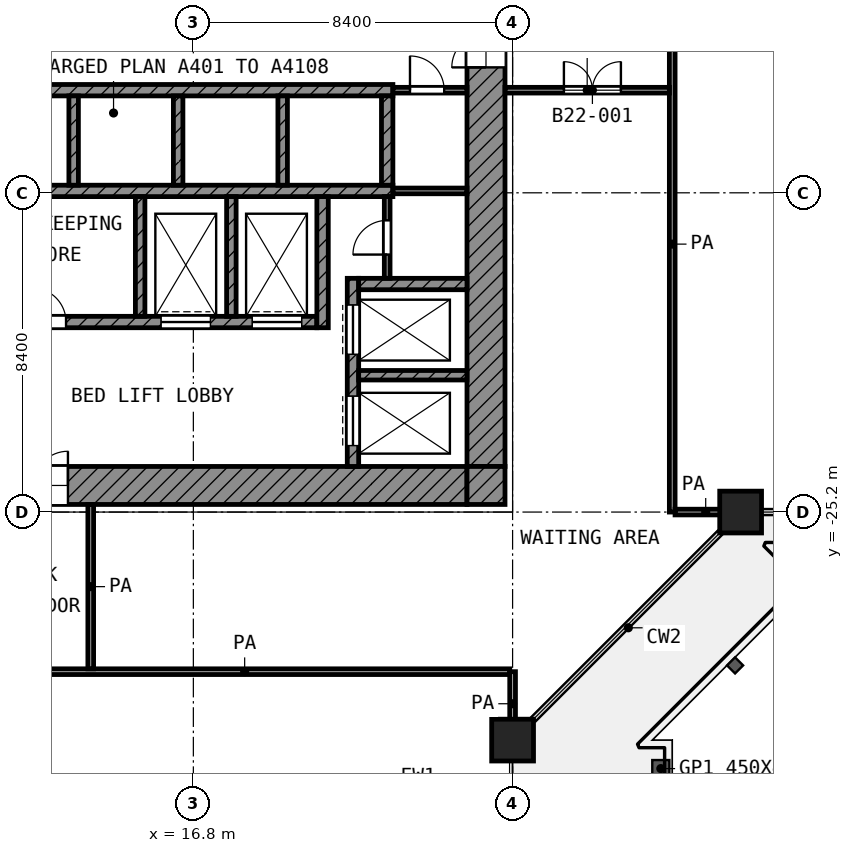
"""IFC4 building model, lengths in metres.
Left out: names, types, materials, properties, quantities, classifications, styles, units other than length and angle.
Written with IfcOpenShell. Run it as: python <this file> out.ifc"""

import sys

from ifc_helpers import new_model, si_unit, direction, frame, frame_2d, origin, origin_2d, place, context, subcontext, project, spatial, rectangle, extrude, element, fill, save


model = new_model("IFC4")
c1 = context("Model", 3, precision=1e-05, world=origin(), true_north=direction((0.0, 1.0)))
c2 = subcontext(c1, "Body", "Model", "MODEL_VIEW")
j1 = project(units=[si_unit("LENGTHUNIT", "METRE"), si_unit("PLANEANGLEUNIT", "RADIAN")], contexts=[c1])
p1 = place(None, origin())
s1 = spatial("IfcSite", under=j1, at=p1, CompositionType="ELEMENT")
p2 = place(p1, origin())
s2 = spatial("IfcBuilding", under=s1, at=p2, CompositionType="ELEMENT")
p3 = place(p2, frame((0.0, 0.0, 98.8)))
s3 = spatial("IfcBuildingStorey", under=s2, at=p3, CompositionType="ELEMENT", Elevation=98.8)
for number, where, z_axis, x_axis in (
    (1, (31.2, -25.2, 0.0), (0.0, 0.0, 1.0), (1.0, 0.0, 0.0)),
    (2, (25.2, -31.2, 0.0), (0.0, 0.0, 1.0), (1.0, 0.0, 0.0)),
):
    element("IfcColumn", number, at=place(p3, frame(where, z_axis=z_axis, x_axis=x_axis)), inside=s3, PredefinedType="COLUMN", context=c2, shape_type="SweptSolid", body=[
        extrude(rectangle(XDim=1.1, YDim=1.1, at=origin_2d()), origin(), (0.0, 0.0, 1.0), 4.2),
    ])
p4 = place(p3, frame((24.5, -24.0, 0.0), z_axis=(0.0, 0.0, 1.0), x_axis=(0.0, 1.0, 0.0)))
e3 = element("IfcWall", 3, at=p4, inside=s3, PredefinedType="SHEAR", context=c2, shape_type="SweptSolid", body=[
    extrude(rectangle(XDim=18.6, YDim=1.0, at=frame_2d((9.3, 0.0))), origin(), (0.0, 0.0, 1.0), 3.6),
])
p5 = place(p4, frame((10.5, 0.0, 0.0)))
e4 = element("IfcOpeningElement", 4, at=p5, cuts=e3, PredefinedType="OPENING", context=c2, shape_type="SweptSolid", body=[
    extrude(rectangle(XDim=1.8, YDim=2.1, at=frame_2d((0.9, 1.05))), frame((0.0, 0.51, 0.0), z_axis=(0.0, -1.0, 0.0), x_axis=(1.0, 0.0, 0.0)), (0.0, 0.0, 1.0), 1.02),
])
p6 = place(p3, frame((5.4, -24.5, 0.0), z_axis=(0.0, 0.0, 1.0), x_axis=(1.0, 0.0, 0.0)))
e5 = element("IfcWall", 5, at=p6, inside=s3, PredefinedType="SHEAR", context=c2, shape_type="SweptSolid", body=[
    extrude(rectangle(XDim=18.6, YDim=1.0, at=frame_2d((9.3, 0.0))), origin(), (0.0, 0.0, 1.0), 3.6),
])
p7 = place(p6, frame((6.3, 0.0, 0.0)))
e6 = element("IfcOpeningElement", 6, at=p7, cuts=e5, PredefinedType="OPENING", context=c2, shape_type="SweptSolid", body=[
    extrude(rectangle(XDim=1.8, YDim=2.1, at=frame_2d((0.9, 1.05))), frame((0.0, 0.51, 0.0), z_axis=(0.0, -1.0, 0.0), x_axis=(1.0, 0.0, 0.0)), (0.0, 0.0, 1.0), 1.02),
])
p8 = place(p3, frame((24.5, -25.0, 0.0), z_axis=(0.0, 0.0, 1.0), x_axis=(0.0, 1.0, 0.0)))
e7 = element("IfcWall", 7, at=p8, inside=s3, PredefinedType="SHEAR", context=c2, shape_type="SweptSolid", body=[
    extrude(rectangle(XDim=1.0, YDim=1.0, at=frame_2d((0.5, 0.0))), origin(), (0.0, 0.0, 1.0), 3.6),
])
for number, where, z_axis, x_axis in (
    (8, (5.4, -14.1, 0.0), (0.0, 0.0, 1.0), (1.0, 0.0, 0.0)),
    (9, (5.4, -16.75, 0.0), (0.0, 0.0, 1.0), (1.0, 0.0, 0.0)),
):
    element("IfcWall", number, at=place(p3, frame(where, z_axis=z_axis, x_axis=x_axis)), inside=s3, PredefinedType="SHEAR", context=c2, shape_type="SweptSolid", body=[
        extrude(rectangle(XDim=16.65, YDim=0.3, at=frame_2d((8.325, 0.0))), origin(), (0.0, 0.0, 1.0), 3.6),
    ])
p9 = place(p3, frame((5.4, -20.2, 0.0), z_axis=(0.0, 0.0, 1.0), x_axis=(1.0, 0.0, 0.0)))
e10 = element("IfcWall", 10, at=p9, inside=s3, PredefinedType="SHEAR", context=c2, shape_type="SweptSolid", body=[
    extrude(rectangle(XDim=14.65, YDim=0.3, at=frame_2d((7.325, 0.0))), origin(), (0.0, 0.0, 1.0), 3.6),
])
p10 = place(p9, frame((10.55, 0.0, 0.0)))
e11 = element("IfcOpeningElement", 11, at=p10, cuts=e10, PredefinedType="OPENING", context=c2, shape_type="SweptSolid", body=[
    extrude(rectangle(XDim=1.3, YDim=2.1, at=frame_2d((0.65, 1.05))), frame((0.0, 0.16, 0.0), z_axis=(0.0, -1.0, 0.0), x_axis=(1.0, 0.0, 0.0)), (0.0, 0.0, 1.0), 0.32),
])
p11 = place(p9, frame((12.95, 0.0, 0.0)))
e12 = element("IfcOpeningElement", 12, at=p11, cuts=e10, PredefinedType="OPENING", context=c2, shape_type="SweptSolid", body=[
    extrude(rectangle(XDim=1.3, YDim=2.1, at=frame_2d((0.65, 1.05))), frame((0.0, 0.16, 0.0), z_axis=(0.0, -1.0, 0.0), x_axis=(1.0, 0.0, 0.0)), (0.0, 0.0, 1.0), 0.32),
])
p12 = place(p9, frame((0.55, 0.0, 0.0)))
e13 = element("IfcOpeningElement", 13, at=p12, cuts=e10, PredefinedType="OPENING", context=c2, shape_type="SweptSolid", body=[
    extrude(rectangle(XDim=1.3, YDim=2.1, at=frame_2d((0.65, 1.05))), frame((0.0, 0.16, 0.0), z_axis=(0.0, -1.0, 0.0), x_axis=(1.0, 0.0, 0.0)), (0.0, 0.0, 1.0), 0.32),
])
p13 = place(p9, frame((2.95, 0.0, 0.0)))
e14 = element("IfcOpeningElement", 14, at=p13, cuts=e10, PredefinedType="OPENING", context=c2, shape_type="SweptSolid", body=[
    extrude(rectangle(XDim=1.3, YDim=2.1, at=frame_2d((0.65, 1.05))), frame((0.0, 0.16, 0.0), z_axis=(0.0, -1.0, 0.0), x_axis=(1.0, 0.0, 0.0)), (0.0, 0.0, 1.0), 0.32),
])
p14 = place(p9, frame((7.15, 0.0, 0.0)))
e15 = element("IfcOpeningElement", 15, at=p14, cuts=e10, PredefinedType="OPENING", context=c2, shape_type="SweptSolid", body=[
    extrude(rectangle(XDim=0.9, YDim=2.1, at=frame_2d((0.45, 1.05))), frame((0.0, 0.16, 0.0), z_axis=(0.0, -1.0, 0.0), x_axis=(1.0, 0.0, 0.0)), (0.0, 0.0, 1.0), 0.32),
])
p15 = place(p3, frame((20.2, -20.35, 0.0), z_axis=(0.0, 0.0, 1.0), x_axis=(0.0, 1.0, 0.0)))
e16 = element("IfcWall", 16, at=p15, inside=s3, PredefinedType="SHEAR", context=c2, shape_type="SweptSolid", body=[
    extrude(rectangle(XDim=3.45, YDim=0.3, at=frame_2d((1.725, 0.0))), origin(), (0.0, 0.0, 1.0), 3.6),
])
p16 = place(p3, frame((21.9, -16.6, 0.0), z_axis=(0.0, 0.0, 1.0), x_axis=(0.0, 1.0, 0.0)))
e17 = element("IfcWall", 17, at=p16, inside=s3, PredefinedType="SHEAR", context=c2, shape_type="SweptSolid", body=[
    extrude(rectangle(XDim=2.35, YDim=0.3, at=frame_2d((1.175, 0.0))), origin(), (0.0, 0.0, 1.0), 3.6),
])
p17 = place(p3, frame((21.15, -19.2, 0.0), z_axis=(0.0, 0.0, 1.0), x_axis=(1.0, 0.0, 0.0)))
e18 = element("IfcWall", 18, at=p17, inside=s3, PredefinedType="SHEAR", context=c2, shape_type="SweptSolid", body=[
    extrude(rectangle(XDim=2.85, YDim=0.3, at=frame_2d((1.425, 0.0))), origin(), (0.0, 0.0, 1.0), 3.6),
])
p18 = place(p3, frame((21.0, -24.0, 0.0), z_axis=(0.0, 0.0, 1.0), x_axis=(0.0, 1.0, 0.0)))
e19 = element("IfcWall", 19, at=p18, inside=s3, PredefinedType="SHEAR", context=c2, shape_type="SweptSolid", body=[
    extrude(rectangle(XDim=4.95, YDim=0.3, at=frame_2d((2.475, 0.0))), origin(), (0.0, 0.0, 1.0), 3.6),
])
p19 = place(p18, frame((2.95, 0.0, 0.0)))
e20 = element("IfcOpeningElement", 20, at=p19, cuts=e19, PredefinedType="OPENING", context=c2, shape_type="SweptSolid", body=[
    extrude(rectangle(XDim=1.3, YDim=2.1, at=frame_2d((0.65, 1.05))), frame((0.0, 0.16, 0.0), z_axis=(0.0, -1.0, 0.0), x_axis=(1.0, 0.0, 0.0)), (0.0, 0.0, 1.0), 0.32),
])
p20 = place(p18, frame((0.55, 0.0, 0.0)))
e21 = element("IfcOpeningElement", 21, at=p20, cuts=e19, PredefinedType="OPENING", context=c2, shape_type="SweptSolid", body=[
    extrude(rectangle(XDim=1.3, YDim=2.1, at=frame_2d((0.65, 1.05))), frame((0.0, 0.16, 0.0), z_axis=(0.0, -1.0, 0.0), x_axis=(1.0, 0.0, 0.0)), (0.0, 0.0, 1.0), 0.32),
])
p21 = place(p3, frame((21.15, -21.6, 0.0), z_axis=(0.0, 0.0, 1.0), x_axis=(1.0, 0.0, 0.0)))
e22 = element("IfcWall", 22, at=p21, inside=s3, PredefinedType="SHEAR", context=c2, shape_type="SweptSolid", body=[
    extrude(rectangle(XDim=2.85, YDim=0.25, at=frame_2d((1.425, 0.0))), origin(), (0.0, 0.0, 1.0), 3.6),
])
for number, where, z_axis, x_axis in (
    (23, (15.4, -20.05, 0.0), (0.0, 0.0, 1.0), (0.0, 1.0, 0.0)),
    (24, (17.8, -20.05, 0.0), (0.0, 0.0, 1.0), (0.0, 1.0, 0.0)),
):
    element("IfcWall", number, at=place(p3, frame(where, z_axis=z_axis, x_axis=x_axis)), inside=s3, PredefinedType="SHEAR", context=c2, shape_type="SweptSolid", body=[
        extrude(rectangle(XDim=3.15, YDim=0.25, at=frame_2d((1.575, 0.0))), origin(), (0.0, 0.0, 1.0), 3.6),
    ])
for number, where, z_axis, x_axis in (
    (25, (13.65, -16.6, 0.0), (0.0, 0.0, 1.0), (0.0, 1.0, 0.0)),
    (26, (16.4, -16.6, 0.0), (0.0, 0.0, 1.0), (0.0, 1.0, 0.0)),
    (27, (19.15, -16.6, 0.0), (0.0, 0.0, 1.0), (0.0, 1.0, 0.0)),
):
    element("IfcWall", number, at=place(p3, frame(where, z_axis=z_axis, x_axis=x_axis)), inside=s3, PredefinedType="SHEAR", context=c2, shape_type="SweptSolid", body=[
        extrude(rectangle(XDim=2.35, YDim=0.25, at=frame_2d((1.175, 0.0))), origin(), (0.0, 0.0, 1.0), 3.6),
    ])
p22 = place(p3, frame((21.9, -19.05, 0.0), z_axis=(0.0, 0.0, 1.0), x_axis=(0.0, 1.0, 0.0)))
e28 = element("IfcWall", 28, at=p22, inside=s3, PredefinedType="PARTITIONING", context=c2, shape_type="SweptSolid", body=[
    extrude(rectangle(XDim=2.15, YDim=0.15, at=frame_2d((1.075, 0.0))), origin(), (0.0, 0.0, 1.0), 3.6),
])
p23 = place(p22, frame((0.625, 0.0, 0.0)))
e29 = element("IfcOpeningElement", 29, at=p23, cuts=e28, PredefinedType="OPENING", context=c2, shape_type="SweptSolid", body=[
    extrude(rectangle(XDim=0.9, YDim=2.1, at=frame_2d((0.45, 1.05))), frame((0.0, 0.085, 0.0), z_axis=(0.0, -1.0, 0.0), x_axis=(1.0, 0.0, 0.0)), (0.0, 0.0, 1.0), 0.17),
])
p24 = place(p3, frame((22.05, -16.75, 0.0), z_axis=(0.0, 0.0, 1.0), x_axis=(1.0, 0.0, 0.0)))
e30 = element("IfcWall", 30, at=p24, inside=s3, PredefinedType="PARTITIONING", context=c2, shape_type="SweptSolid", body=[
    extrude(rectangle(XDim=1.95, YDim=0.15, at=frame_2d((0.975, 0.0))), origin(), (0.0, 0.0, 1.0), 3.6),
])
p25 = place(p3, frame((22.05, -14.1, 0.0), z_axis=(0.0, 0.0, 1.0), x_axis=(1.0, 0.0, 0.0)))
e31 = element("IfcWall", 31, at=p25, inside=s3, PredefinedType="PARTITIONING", context=c2, shape_type="SweptSolid", body=[
    extrude(rectangle(XDim=1.95, YDim=0.15, at=frame_2d((0.975, 0.0))), origin(), (0.0, 0.0, 1.0), 3.6),
])
p26 = place(p25, frame((0.45, 0.0, 0.0)))
e32 = element("IfcOpeningElement", 32, at=p26, cuts=e31, PredefinedType="OPENING", context=c2, shape_type="SweptSolid", body=[
    extrude(rectangle(XDim=0.9, YDim=2.1, at=frame_2d((0.45, 1.05))), frame((0.0, 0.085, 0.0), z_axis=(0.0, -1.0, 0.0), x_axis=(1.0, 0.0, 0.0)), (0.0, 0.0, 1.0), 0.17),
])
p27 = place(p3, frame((11.175, -29.4, 0.0), z_axis=(0.0, 0.0, 1.0), x_axis=(1.0, 0.0, 0.0)))
e33 = element("IfcWall", 33, at=p27, inside=s3, PredefinedType="PARTITIONING", context=c2, shape_type="SweptSolid", body=[
    extrude(rectangle(XDim=13.95, YDim=0.15, at=frame_2d((6.975, 0.0))), origin(), (0.0, 0.0, 1.0), 3.6),
])
p28 = place(p3, frame((29.475, -25.2, 0.0), z_axis=(0.0, 0.0, 1.0), x_axis=(1.0, 0.0, 0.0)))
e34 = element("IfcWall", 34, at=p28, inside=s3, PredefinedType="PARTITIONING", context=c2, shape_type="SweptSolid", body=[
    extrude(rectangle(XDim=1.612, YDim=0.15, at=frame_2d((0.806, 0.0))), origin(), (0.0, 0.0, 1.0), 3.6),
])
p29 = place(p3, frame((25.0, -14.1, 0.0), z_axis=(0.0, 0.0, 1.0), x_axis=(1.0, 0.0, 0.0)))
e35 = element("IfcWall", 35, at=p29, inside=s3, PredefinedType="PARTITIONING", context=c2, shape_type="SweptSolid", body=[
    extrude(rectangle(XDim=4.325, YDim=0.15, at=frame_2d((2.163, 0.0))), origin(), (0.0, 0.0, 1.0), 3.6),
])
p30 = place(p29, frame((1.55, 0.0, 0.0)))
e36 = element("IfcOpeningElement", 36, at=p30, cuts=e35, PredefinedType="OPENING", context=c2, shape_type="SweptSolid", body=[
    extrude(rectangle(XDim=1.5, YDim=2.1, at=frame_2d((0.75, 1.05))), frame((0.0, 0.085, 0.0), z_axis=(0.0, -1.0, 0.0), x_axis=(1.0, 0.0, 0.0)), (0.0, 0.0, 1.0), 0.17),
])
p31 = place(p3, frame((14.1, -29.325, 0.0), z_axis=(0.0, 0.0, 1.0), x_axis=(0.0, 1.0, 0.0)))
e37 = element("IfcWall", 37, at=p31, inside=s3, PredefinedType="PARTITIONING", context=c2, shape_type="SweptSolid", body=[
    extrude(rectangle(XDim=4.325, YDim=0.15, at=frame_2d((2.163, 0.0))), origin(), (0.0, 0.0, 1.0), 3.6),
])
p32 = place(p3, frame((25.2, -31.087, 0.0), z_axis=(0.0, 0.0, 1.0), x_axis=(0.0, 1.0, 0.0)))
e38 = element("IfcWall", 38, at=p32, inside=s3, PredefinedType="PARTITIONING", context=c2, shape_type="SweptSolid", body=[
    extrude(rectangle(XDim=1.687, YDim=0.15, at=frame_2d((0.844, 0.0))), origin(), (0.0, 0.0, 1.0), 3.6),
])
p33 = place(p3, frame((29.4, -25.2, 0.0), z_axis=(0.0, 0.0, 1.0), x_axis=(0.0, 1.0, 0.0)))
e39 = element("IfcWall", 39, at=p33, inside=s3, PredefinedType="PARTITIONING", context=c2, shape_type="SweptSolid", body=[
    extrude(rectangle(XDim=14.1, YDim=0.15, at=frame_2d((7.05, 0.0))), origin(), (0.0, 0.0, 1.0), 3.6),
])
p34 = place(p19, origin())
e40 = element("IfcDoor", 40, at=p34, inside=s3, OperationType="DOUBLE_DOOR_SLIDING", PredefinedType="DOOR", context=c2, shape_type="SweptSolid", body=[
    extrude(rectangle(XDim=1.3, YDim=2.1, at=frame_2d((0.65, 1.05))), frame((0.0, 0.025, 0.0), z_axis=(0.0, -1.0, 0.0), x_axis=(1.0, 0.0, 0.0)), (0.0, 0.0, 1.0), 0.05),
])
fill(e20, e40)
p35 = place(p20, origin())
e41 = element("IfcDoor", 41, at=p35, inside=s3, OperationType="DOUBLE_DOOR_SLIDING", PredefinedType="DOOR", context=c2, shape_type="SweptSolid", body=[
    extrude(rectangle(XDim=1.3, YDim=2.1, at=frame_2d((0.65, 1.05))), frame((0.0, 0.025, 0.0), z_axis=(0.0, -1.0, 0.0), x_axis=(1.0, 0.0, 0.0)), (0.0, 0.0, 1.0), 0.05),
])
fill(e21, e41)
p36 = place(p10, origin())
e42 = element("IfcDoor", 42, at=p36, inside=s3, OperationType="DOUBLE_DOOR_SLIDING", PredefinedType="DOOR", context=c2, shape_type="SweptSolid", body=[
    extrude(rectangle(XDim=1.3, YDim=2.1, at=frame_2d((0.65, 1.05))), frame((0.0, 0.025, 0.0), z_axis=(0.0, -1.0, 0.0), x_axis=(1.0, 0.0, 0.0)), (0.0, 0.0, 1.0), 0.05),
])
fill(e11, e42)
p37 = place(p11, origin())
e43 = element("IfcDoor", 43, at=p37, inside=s3, OperationType="DOUBLE_DOOR_SLIDING", PredefinedType="DOOR", context=c2, shape_type="SweptSolid", body=[
    extrude(rectangle(XDim=1.3, YDim=2.1, at=frame_2d((0.65, 1.05))), frame((0.0, 0.025, 0.0), z_axis=(0.0, -1.0, 0.0), x_axis=(1.0, 0.0, 0.0)), (0.0, 0.0, 1.0), 0.05),
])
fill(e12, e43)
p38 = place(p5, origin())
e44 = element("IfcDoor", 44, at=p38, inside=s3, OperationType="DOUBLE_DOOR_SINGLE_SWING", PredefinedType="DOOR", context=c2, shape_type="SweptSolid", body=[
    extrude(rectangle(XDim=1.8, YDim=2.1, at=frame_2d((0.9, 1.05))), frame((0.0, 0.025, 0.0), z_axis=(0.0, -1.0, 0.0), x_axis=(1.0, 0.0, 0.0)), (0.0, 0.0, 1.0), 0.05),
])
fill(e4, e44)
p39 = place(p7, origin())
e45 = element("IfcDoor", 45, at=p39, inside=s3, OperationType="DOUBLE_DOOR_SINGLE_SWING", PredefinedType="DOOR", context=c2, shape_type="SweptSolid", body=[
    extrude(rectangle(XDim=1.8, YDim=2.1, at=frame_2d((0.9, 1.05))), frame((0.0, 0.025, 0.0), z_axis=(0.0, -1.0, 0.0), x_axis=(1.0, 0.0, 0.0)), (0.0, 0.0, 1.0), 0.05),
])
fill(e6, e45)
p40 = place(p26, origin())
e46 = element("IfcDoor", 46, at=p40, inside=s3, OperationType="SINGLE_SWING_LEFT", PredefinedType="DOOR", context=c2, shape_type="SweptSolid", body=[
    extrude(rectangle(XDim=0.9, YDim=2.1, at=frame_2d((0.45, 1.05))), frame((0.0, 0.025, 0.0), z_axis=(0.0, -1.0, 0.0), x_axis=(1.0, 0.0, 0.0)), (0.0, 0.0, 1.0), 0.05),
])
fill(e32, e46)
p41 = place(p23, origin())
e47 = element("IfcDoor", 47, at=p41, inside=s3, OperationType="SINGLE_SWING_LEFT", PredefinedType="DOOR", context=c2, shape_type="SweptSolid", body=[
    extrude(rectangle(XDim=0.9, YDim=2.1, at=frame_2d((0.45, 1.05))), frame((0.0, 0.025, 0.0), z_axis=(0.0, -1.0, 0.0), x_axis=(1.0, 0.0, 0.0)), (0.0, 0.0, 1.0), 0.05),
])
fill(e29, e47)
p42 = place(p14, origin())
e48 = element("IfcDoor", 48, at=p42, inside=s3, OperationType="SINGLE_SWING_LEFT", PredefinedType="DOOR", context=c2, shape_type="SweptSolid", body=[
    extrude(rectangle(XDim=0.9, YDim=2.1, at=frame_2d((0.45, 1.05))), frame((0.0, 0.025, 0.0), z_axis=(0.0, -1.0, 0.0), x_axis=(1.0, 0.0, 0.0)), (0.0, 0.0, 1.0), 0.05),
])
fill(e15, e48)
p43 = place(p30, origin())
e49 = element("IfcDoor", 49, at=p43, inside=s3, OperationType="DOUBLE_DOOR_SINGLE_SWING", PredefinedType="DOOR", context=c2, shape_type="SweptSolid", body=[
    extrude(rectangle(XDim=1.5, YDim=2.1, at=frame_2d((0.75, 1.05))), frame((0.0, 0.025, 0.0), z_axis=(0.0, -1.0, 0.0), x_axis=(1.0, 0.0, 0.0)), (0.0, 0.0, 1.0), 0.05),
])
fill(e36, e49)
save(model, sys.argv[1])
